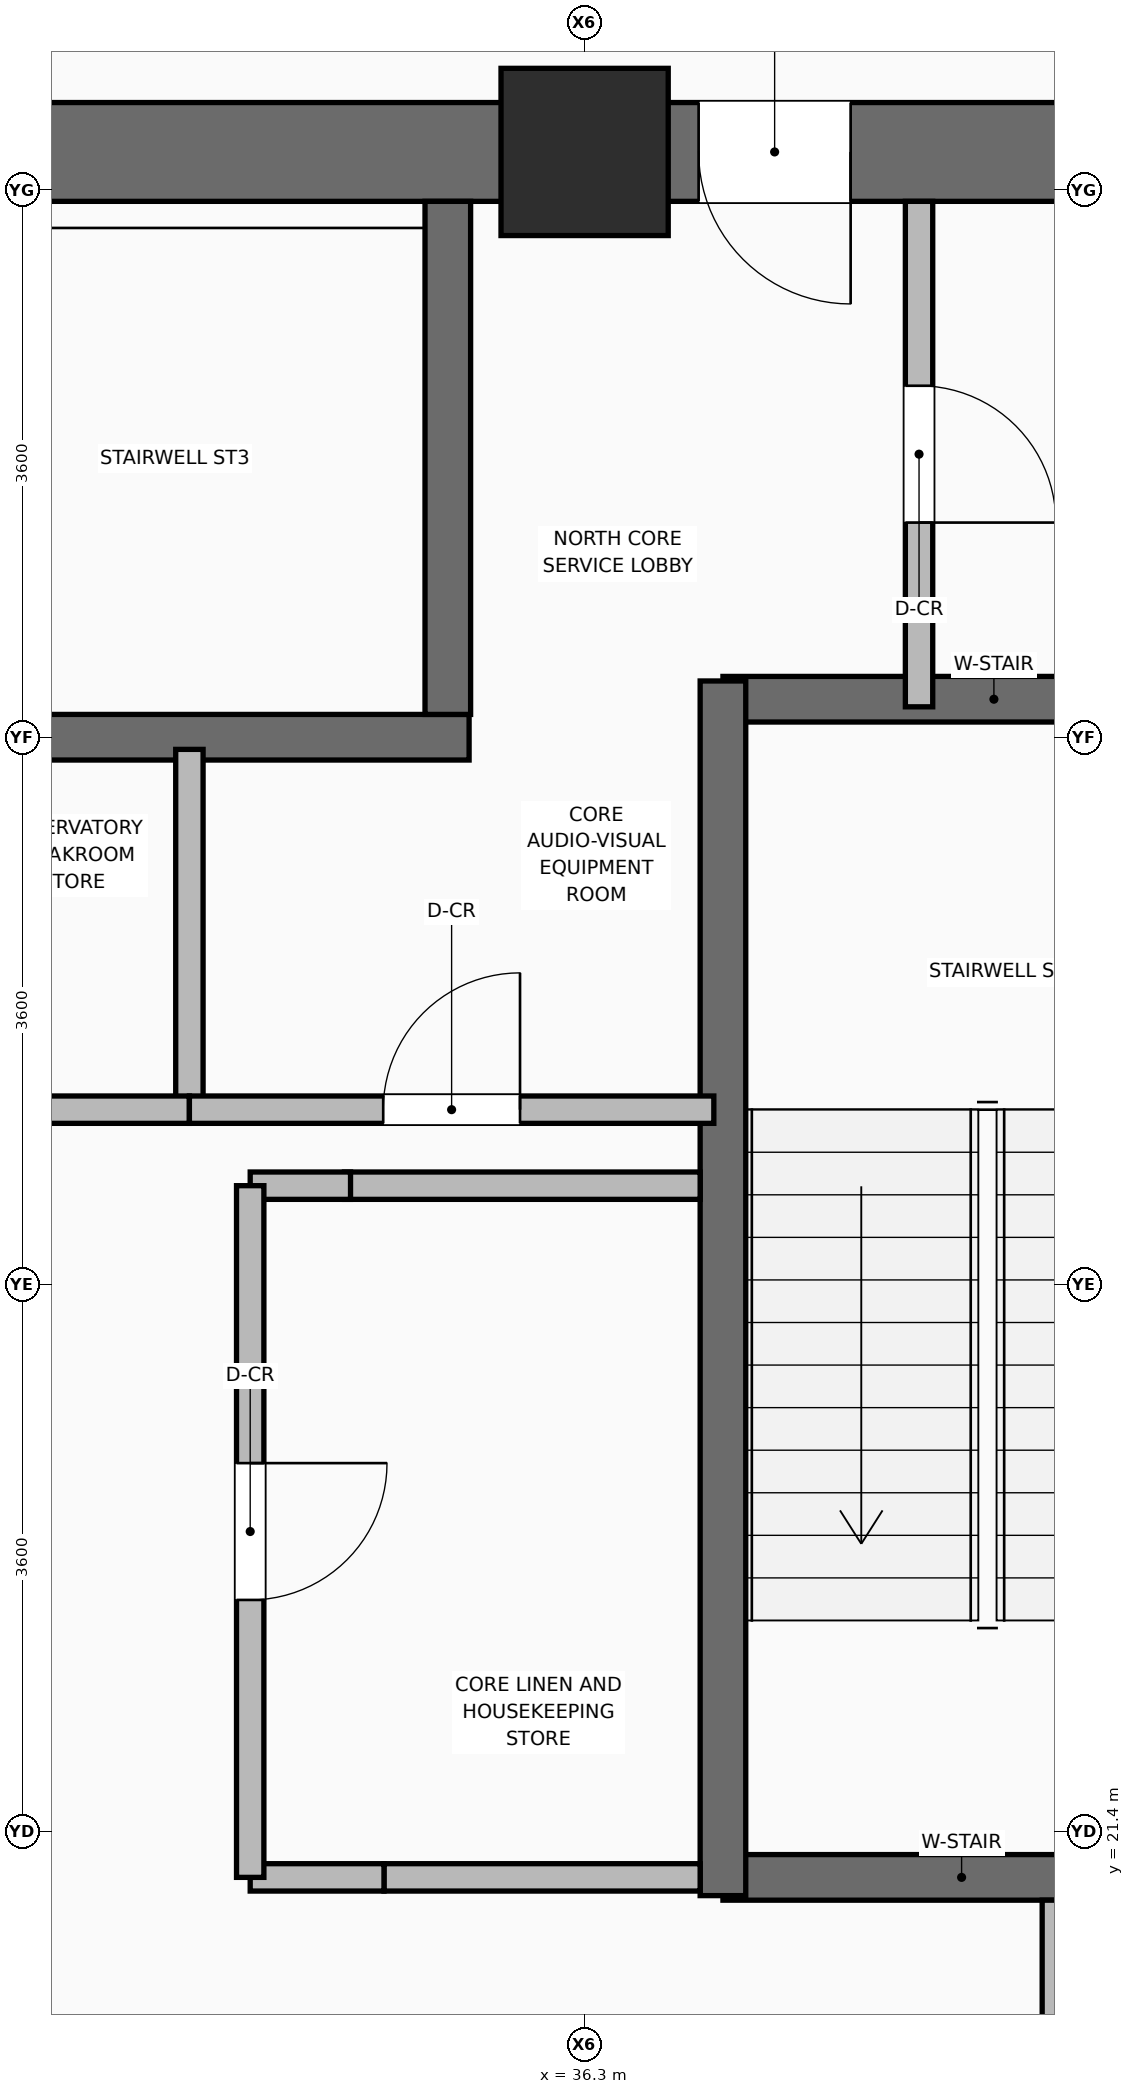
"""IFC4 building model, lengths in metres.
Left out: names, types, materials, properties, quantities, classifications, styles, units other than length and angle.
Written with IfcOpenShell. Run it as: python <this file> out.ifc"""

import sys

from ifc_helpers import new_model, si_unit, direction, frame, frame_2d, origin, origin_2d, place, context, subcontext, project, spatial, rectangle, extrude, element, fill, save


model = new_model("IFC4")
c1 = context("Model", 3, precision=1e-05, world=origin(), true_north=direction((0.0, 1.0)))
c2 = subcontext(c1, "Body", "Model", "MODEL_VIEW")
j1 = project(units=[si_unit("LENGTHUNIT", "METRE"), si_unit("PLANEANGLEUNIT", "RADIAN")], contexts=[c1])
p1 = place(None, origin())
s1 = spatial("IfcSite", under=j1, at=p1, CompositionType="ELEMENT")
p2 = place(p1, origin())
s2 = spatial("IfcBuilding", under=s1, at=p2, CompositionType="ELEMENT")
p3 = place(p2, frame((0.0, 0.0, -9.0)))
s3 = spatial("IfcBuildingStorey", under=s2, at=p3, CompositionType="ELEMENT", Elevation=-9.0)
p4 = place(p3, frame((36.3, 32.45, 0.0), z_axis=(0.0, 0.0, 1.0), x_axis=(1.0, 0.0, 0.0)))
e1 = element("IfcColumn", 1, at=p4, inside=s3, PredefinedType="COLUMN", context=c2, shape_type="SweptSolid", body=[
    extrude(rectangle(XDim=1.1, YDim=1.1, at=origin_2d()), origin(), (0.0, 0.0, 1.0), 4.5),
])
p5 = place(p3, frame((21.575, 32.45, 0.0), z_axis=(0.0, 0.0, 1.0), x_axis=(1.0, 0.0, 0.0)))
e2 = element("IfcWall", 2, at=p5, inside=s3, PredefinedType="SHEAR", context=c2, shape_type="SweptSolid", body=[
    extrude(rectangle(XDim=19.85, YDim=0.65, at=frame_2d((9.925, 0.0))), origin(), (0.0, 0.0, 1.0), 4.25),
])
p6 = place(p5, frame((2.175, 0.0, 0.0)))
e3 = element("IfcOpeningElement", 3, at=p6, cuts=e2, PredefinedType="OPENING", context=c2, shape_type="SweptSolid", body=[
    extrude(rectangle(XDim=1.1, YDim=2.1, at=frame_2d((0.55, 1.05))), frame((0.0, 0.335, 0.0), z_axis=(0.0, -1.0, 0.0), x_axis=(1.0, 0.0, 0.0)), (0.0, 0.0, 1.0), 0.67),
])
p7 = place(p5, frame((15.475, 0.0, 0.0)))
e4 = element("IfcOpeningElement", 4, at=p7, cuts=e2, PredefinedType="OPENING", context=c2, shape_type="SweptSolid", body=[
    extrude(rectangle(XDim=1.0, YDim=2.1, at=frame_2d((0.5, 1.05))), frame((0.0, 0.335, 0.0), z_axis=(0.0, -1.0, 0.0), x_axis=(1.0, 0.0, 0.0)), (0.0, 0.0, 1.0), 0.67),
])
for number, where, z_axis, x_axis in (
    (5, (37.21, 21.1, 0.0), (0.0, 0.0, 1.0), (1.0, 0.0, 0.0)),
    (6, (37.21, 28.85, 0.0), (0.0, 0.0, 1.0), (1.0, 0.0, 0.0)),
):
    element("IfcWall", number, at=place(p3, frame(where, z_axis=z_axis, x_axis=x_axis)), inside=s3, PredefinedType="SHEAR", context=c2, shape_type="SweptSolid", body=[
        extrude(rectangle(XDim=3.565, YDim=0.3, at=frame_2d((1.782, 0.0))), origin(), (0.0, 0.0, 1.0), 4.25),
    ])
p8 = place(p3, frame((37.21, 20.98, 0.0), z_axis=(0.0, 0.0, 1.0), x_axis=(0.0, 1.0, 0.0)))
e7 = element("IfcWall", 7, at=p8, inside=s3, PredefinedType="SHEAR", context=c2, shape_type="SweptSolid", body=[
    extrude(rectangle(XDim=7.99, YDim=0.3, at=frame_2d((3.995, 0.0))), origin(), (0.0, 0.0, 1.0), 4.25),
])
p9 = place(p3, frame((27.51, 28.6, 0.0), z_axis=(0.0, 0.0, 1.0), x_axis=(1.0, 0.0, 0.0)))
e8 = element("IfcWall", 8, at=p9, inside=s3, PredefinedType="SHEAR", context=c2, shape_type="SweptSolid", body=[
    extrude(rectangle(XDim=8.03, YDim=0.3, at=frame_2d((4.015, 0.0))), origin(), (0.0, 0.0, 1.0), 4.25),
])
p10 = place(p3, frame((35.4, 28.75, 0.0), z_axis=(0.0, 0.0, 1.0), x_axis=(0.0, 1.0, 0.0)))
e9 = element("IfcWall", 9, at=p10, inside=s3, PredefinedType="SHEAR", context=c2, shape_type="SweptSolid", body=[
    extrude(rectangle(XDim=3.375, YDim=0.3, at=frame_2d((1.688, 0.0))), origin(), (0.0, 0.0, 1.0), 4.25),
])
p11 = place(p3, frame((39.42, 18.125, 0.0), z_axis=(0.0, 0.0, 1.0), x_axis=(0.0, 1.0, 0.0)))
e10 = element("IfcWall", 10, at=p11, inside=s3, PredefinedType="PARTITIONING", context=c2, shape_type="SweptSolid", body=[
    extrude(rectangle(XDim=2.825, YDim=0.22, at=frame_2d((1.413, 0.0))), origin(), (0.0, 0.0, 1.0), 4.23),
])
p12 = place(p3, frame((34.98, 21.1, 0.0), z_axis=(0.0, 0.0, 1.0), x_axis=(1.0, 0.0, 0.0)))
e11 = element("IfcWall", 11, at=p12, inside=s3, PredefinedType="PARTITIONING", context=c2, shape_type="SweptSolid", body=[
    extrude(rectangle(XDim=2.08, YDim=0.18, at=frame_2d((1.04, 0.0))), origin(), (0.0, 0.0, 1.0), 4.23),
])
p13 = place(p3, frame((34.72, 25.65, 0.0), z_axis=(0.0, 0.0, 1.0), x_axis=(1.0, 0.0, 0.0)))
e12 = element("IfcWall", 12, at=p13, inside=s3, PredefinedType="PARTITIONING", context=c2, shape_type="SweptSolid", body=[
    extrude(rectangle(XDim=2.34, YDim=0.18, at=frame_2d((1.17, 0.0))), origin(), (0.0, 0.0, 1.0), 4.23),
])
p14 = place(p3, frame((34.1, 21.1, 0.0), z_axis=(0.0, 0.0, 1.0), x_axis=(1.0, 0.0, 0.0)))
e13 = element("IfcWall", 13, at=p14, inside=s3, PredefinedType="PARTITIONING", context=c2, shape_type="SweptSolid", body=[
    extrude(rectangle(XDim=0.88, YDim=0.18, at=frame_2d((0.44, 0.0))), origin(), (0.0, 0.0, 1.0), 4.23),
])
p15 = place(p3, frame((34.1, 25.65, 0.0), z_axis=(0.0, 0.0, 1.0), x_axis=(1.0, 0.0, 0.0)))
e14 = element("IfcWall", 14, at=p15, inside=s3, PredefinedType="PARTITIONING", context=c2, shape_type="SweptSolid", body=[
    extrude(rectangle(XDim=0.66, YDim=0.18, at=frame_2d((0.33, 0.0))), origin(), (0.0, 0.0, 1.0), 4.23),
])
p16 = place(p3, frame((34.1, 21.1, 0.0), z_axis=(0.0, 0.0, 1.0), x_axis=(0.0, 1.0, 0.0)))
e15 = element("IfcWall", 15, at=p16, inside=s3, PredefinedType="PARTITIONING", context=c2, shape_type="SweptSolid", body=[
    extrude(rectangle(XDim=4.55, YDim=0.18, at=frame_2d((2.275, 0.0))), origin(), (0.0, 0.0, 1.0), 4.23),
])
p17 = place(p16, frame((1.825, 0.0, 0.0)))
e16 = element("IfcOpeningElement", 16, at=p17, cuts=e15, PredefinedType="OPENING", context=c2, shape_type="SweptSolid", body=[
    extrude(rectangle(XDim=0.9, YDim=2.1, at=frame_2d((0.45, 1.05))), frame((0.0, 0.1, 0.0), z_axis=(0.0, -1.0, 0.0), x_axis=(1.0, 0.0, 0.0)), (0.0, 0.0, 1.0), 0.2),
])
p18 = place(p3, frame((33.7, 26.15, 0.0), z_axis=(0.0, 0.0, 1.0), x_axis=(0.0, 1.0, 0.0)))
e17 = element("IfcWall", 17, at=p18, inside=s3, PredefinedType="PARTITIONING", context=c2, shape_type="SweptSolid", body=[
    extrude(rectangle(XDim=2.37, YDim=0.18, at=frame_2d((1.185, 0.0))), origin(), (0.0, 0.0, 1.0), 4.23),
])
p19 = place(p3, frame((30.2, 26.15, 0.0), z_axis=(0.0, 0.0, 1.0), x_axis=(1.0, 0.0, 0.0)))
e18 = element("IfcWall", 18, at=p19, inside=s3, PredefinedType="PARTITIONING", context=c2, shape_type="SweptSolid", body=[
    extrude(rectangle(XDim=3.5, YDim=0.18, at=frame_2d((1.75, 0.0))), origin(), (0.0, 0.0, 1.0), 4.23),
])
p20 = place(p19, frame((1.3, 0.0, 0.0)))
e19 = element("IfcOpeningElement", 19, at=p20, cuts=e18, PredefinedType="OPENING", context=c2, shape_type="SweptSolid", body=[
    extrude(rectangle(XDim=0.9, YDim=2.1, at=frame_2d((0.45, 1.05))), frame((0.0, 0.1, 0.0), z_axis=(0.0, -1.0, 0.0), x_axis=(1.0, 0.0, 0.0)), (0.0, 0.0, 1.0), 0.2),
])
p21 = place(p3, frame((33.7, 26.15, 0.0), z_axis=(0.0, 0.0, 1.0), x_axis=(1.0, 0.0, 0.0)))
e20 = element("IfcWall", 20, at=p21, inside=s3, PredefinedType="PARTITIONING", context=c2, shape_type="SweptSolid", body=[
    extrude(rectangle(XDim=3.45, YDim=0.18, at=frame_2d((1.725, 0.0))), origin(), (0.0, 0.0, 1.0), 4.23),
])
p22 = place(p21, frame((1.275, 0.0, 0.0)))
e21 = element("IfcOpeningElement", 21, at=p22, cuts=e20, PredefinedType="OPENING", context=c2, shape_type="SweptSolid", body=[
    extrude(rectangle(XDim=0.9, YDim=2.1, at=frame_2d((0.45, 1.05))), frame((0.0, 0.1, 0.0), z_axis=(0.0, -1.0, 0.0), x_axis=(1.0, 0.0, 0.0)), (0.0, 0.0, 1.0), 0.2),
])
p23 = place(p3, frame((38.5, 28.8, 0.0), z_axis=(0.0, 0.0, 1.0), x_axis=(0.0, 1.0, 0.0)))
e22 = element("IfcWall", 22, at=p23, inside=s3, PredefinedType="PARTITIONING", context=c2, shape_type="SweptSolid", body=[
    extrude(rectangle(XDim=3.325, YDim=0.18, at=frame_2d((1.663, 0.0))), origin(), (0.0, 0.0, 1.0), 4.23),
])
p24 = place(p23, frame((1.212, 0.0, 0.0)))
e23 = element("IfcOpeningElement", 23, at=p24, cuts=e22, PredefinedType="OPENING", context=c2, shape_type="SweptSolid", body=[
    extrude(rectangle(XDim=0.9, YDim=2.1, at=frame_2d((0.45, 1.05))), frame((0.0, 0.1, 0.0), z_axis=(0.0, -1.0, 0.0), x_axis=(1.0, 0.0, 0.0)), (0.0, 0.0, 1.0), 0.2),
])
p25 = place(p17, frame((0.9, 0.0, 0.0), z_axis=(0.0, 0.0, 1.0), x_axis=(-1.0, 0.0, 0.0)))
e24 = element("IfcDoor", 24, at=p25, inside=s3, OperationType="SINGLE_SWING_LEFT", PredefinedType="DOOR", context=c2, shape_type="SweptSolid", body=[
    extrude(rectangle(XDim=0.9, YDim=2.1, at=frame_2d((0.45, 1.05))), frame((0.0, 0.025, 0.0), z_axis=(0.0, -1.0, 0.0), x_axis=(1.0, 0.0, 0.0)), (0.0, 0.0, 1.0), 0.05),
])
fill(e16, e24)
p26 = place(p22, origin())
e25 = element("IfcDoor", 25, at=p26, inside=s3, OperationType="SINGLE_SWING_RIGHT", PredefinedType="DOOR", context=c2, shape_type="SweptSolid", body=[
    extrude(rectangle(XDim=0.9, YDim=2.1, at=frame_2d((0.45, 1.05))), frame((0.0, 0.025, 0.0), z_axis=(0.0, -1.0, 0.0), x_axis=(1.0, 0.0, 0.0)), (0.0, 0.0, 1.0), 0.05),
])
fill(e21, e25)
p27 = place(p7, frame((1.0, 0.0, 0.0), z_axis=(0.0, 0.0, 1.0), x_axis=(-1.0, 0.0, 0.0)))
e26 = element("IfcDoor", 26, at=p27, inside=s3, OperationType="SINGLE_SWING_LEFT", PredefinedType="DOOR", context=c2, shape_type="SweptSolid", body=[
    extrude(rectangle(XDim=1.0, YDim=2.1, at=frame_2d((0.5, 1.05))), frame((0.0, 0.025, 0.0), z_axis=(0.0, -1.0, 0.0), x_axis=(1.0, 0.0, 0.0)), (0.0, 0.0, 1.0), 0.05),
])
fill(e4, e26)
p28 = place(p24, frame((0.9, 0.0, 0.0), z_axis=(0.0, 0.0, 1.0), x_axis=(-1.0, 0.0, 0.0)))
e27 = element("IfcDoor", 27, at=p28, inside=s3, OperationType="SINGLE_SWING_RIGHT", PredefinedType="DOOR", context=c2, shape_type="SweptSolid", body=[
    extrude(rectangle(XDim=0.9, YDim=2.1, at=frame_2d((0.45, 1.05))), frame((0.0, 0.025, 0.0), z_axis=(0.0, -1.0, 0.0), x_axis=(1.0, 0.0, 0.0)), (0.0, 0.0, 1.0), 0.05),
])
fill(e23, e27)
save(model, sys.argv[1])
